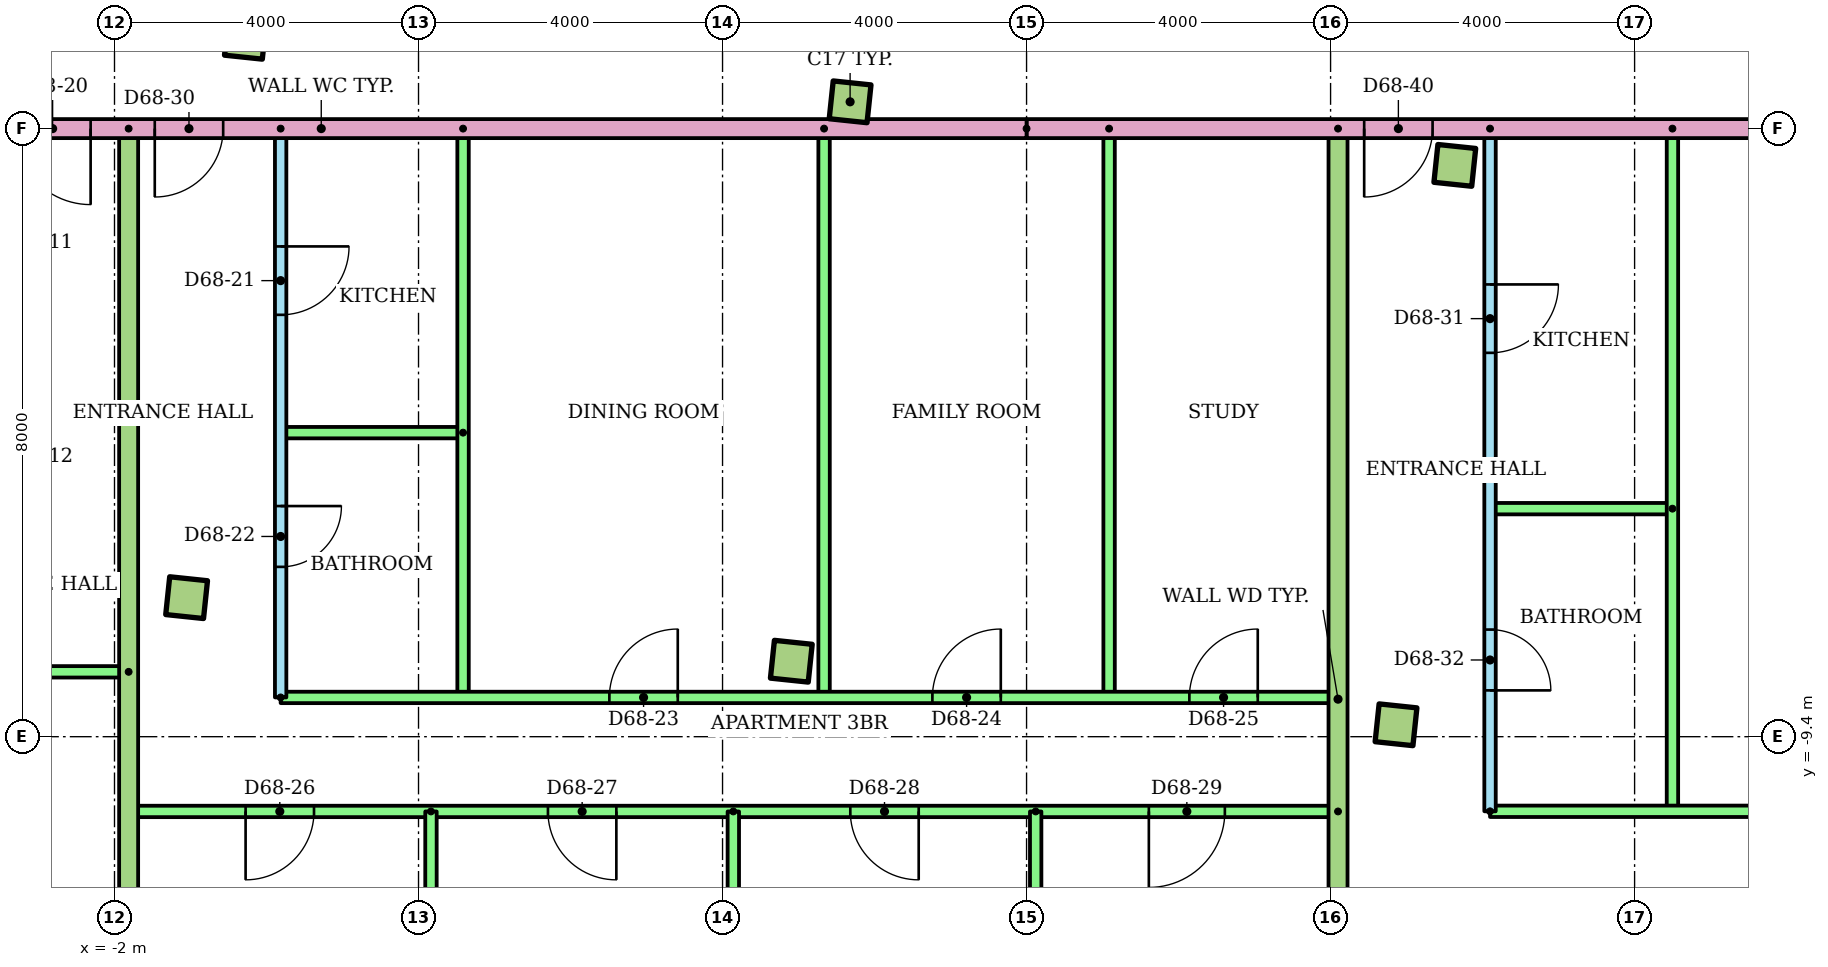
"""IFC4 building model, lengths in metres.
Left out: names, types, materials, properties, quantities, classifications, styles, units other than length and angle.
Written with IfcOpenShell. Run it as: python <this file> out.ifc"""

import sys

from ifc_helpers import new_model, si_unit, direction, frame, frame_2d, origin, origin_2d, place, context, subcontext, project, spatial, rectangle, extrude, element, fill, save


model = new_model("IFC4")
c1 = context("Model", 3, precision=1e-05, world=origin(), true_north=direction((0.0, 1.0)))
c2 = subcontext(c1, "Body", "Model", "MODEL_VIEW")
j1 = project(units=[si_unit("LENGTHUNIT", "METRE"), si_unit("PLANEANGLEUNIT", "RADIAN")], contexts=[c1])
p1 = place(None, origin())
s1 = spatial("IfcSite", under=j1, at=p1, CompositionType="ELEMENT")
p2 = place(p1, origin())
s2 = spatial("IfcBuilding", under=s1, at=p2, CompositionType="ELEMENT")
p3 = place(p2, frame((0.0, 0.0, 262.7)))
s3 = spatial("IfcBuildingStorey", under=s2, at=p3, CompositionType="ELEMENT", Elevation=262.7)
for number, where, z_axis, x_axis in (
    (1, (-1.051, -7.571, 0.0), (0.0, 0.0, 1.0), (0.995, -0.105, 0.0)),
    (2, (6.905, -8.407, 0.0), (0.0, 0.0, 1.0), (0.995, -0.105, 0.0)),
    (3, (14.861, -9.243, 0.0), (0.0, 0.0, 1.0), (0.995, -0.105, 0.0)),
    (4, (-0.278, -0.211, 0.0), (0.0, 0.0, 1.0), (0.995, -0.105, 0.0)),
    (5, (7.678, -1.048, 0.0), (0.0, 0.0, 1.0), (0.995, -0.105, 0.0)),
    (6, (15.635, -1.884, 0.0), (0.0, 0.0, 1.0), (0.995, -0.105, 0.0)),
):
    element("IfcColumn", number, at=place(p3, frame(where, z_axis=z_axis, x_axis=x_axis)), inside=s3, PredefinedType="COLUMN", context=c2, shape_type="SweptSolid", body=[
        extrude(rectangle(XDim=0.5, YDim=0.5, at=origin_2d()), origin(), (0.0, 0.0, 1.0), 3.2),
    ])
p4 = place(p3, frame((-1.814, -8.547, 0.0), z_axis=(0.0, 0.0, 1.0), x_axis=(-1.0, 0.0, 0.0)))
e7 = element("IfcWall", 7, at=p4, inside=s3, PredefinedType="PARTITIONING", context=c2, shape_type="SweptSolid", body=[
    extrude(rectangle(XDim=20.767, YDim=0.15, at=frame_2d((10.384, 0.0))), origin(), (0.0, 0.0, 1.0), 2.4),
])
p5 = place(p4, frame((16.604, 0.0, 0.0)))
e8 = element("IfcOpeningElement", 8, at=p5, cuts=e7, PredefinedType="OPENING", context=c2, shape_type="SweptSolid", body=[
    extrude(rectangle(XDim=0.9, YDim=2.1, at=frame_2d((0.45, 1.05))), frame((0.0, 0.085, 0.0), z_axis=(0.0, -1.0, 0.0), x_axis=(1.0, 0.0, 0.0)), (0.0, 0.0, 1.0), 0.17),
])
p6 = place(p4, frame((9.446, 0.0, 0.0)))
e9 = element("IfcOpeningElement", 9, at=p6, cuts=e7, PredefinedType="OPENING", context=c2, shape_type="SweptSolid", body=[
    extrude(rectangle(XDim=1.0, YDim=2.1, at=frame_2d((0.5, 1.05))), frame((0.0, 0.085, 0.0), z_axis=(0.0, -1.0, 0.0), x_axis=(1.0, 0.0, 0.0)), (0.0, 0.0, 1.0), 0.17),
])
p7 = place(p4, frame((5.517, 0.0, 0.0)))
e10 = element("IfcOpeningElement", 10, at=p7, cuts=e7, PredefinedType="OPENING", context=c2, shape_type="SweptSolid", body=[
    extrude(rectangle(XDim=0.9, YDim=2.1, at=frame_2d((0.45, 1.05))), frame((0.0, 0.085, 0.0), z_axis=(0.0, -1.0, 0.0), x_axis=(1.0, 0.0, 0.0)), (0.0, 0.0, 1.0), 0.17),
])
p8 = place(p4, frame((1.539, 0.0, 0.0)))
e11 = element("IfcOpeningElement", 11, at=p8, cuts=e7, PredefinedType="OPENING", context=c2, shape_type="SweptSolid", body=[
    extrude(rectangle(XDim=0.9, YDim=2.1, at=frame_2d((0.45, 1.05))), frame((0.0, 0.085, 0.0), z_axis=(0.0, -1.0, 0.0), x_axis=(1.0, 0.0, 0.0)), (0.0, 0.0, 1.0), 0.17),
])
p9 = place(p3, frame((0.186, -1.4, 0.0), z_axis=(0.0, 0.0, 1.0), x_axis=(0.0, -1.0, 0.0)))
e12 = element("IfcWall", 12, at=p9, inside=s3, PredefinedType="PARTITIONING", context=c2, shape_type="SweptSolid", body=[
    extrude(rectangle(XDim=7.484, YDim=0.15, at=frame_2d((3.742, 0.0))), origin(), (0.0, 0.0, 1.0), 2.4),
])
p10 = place(p9, frame((1.55, 0.0, 0.0)))
e13 = element("IfcOpeningElement", 13, at=p10, cuts=e12, PredefinedType="OPENING", context=c2, shape_type="SweptSolid", body=[
    extrude(rectangle(XDim=0.9, YDim=2.1, at=frame_2d((0.45, 1.05))), frame((0.0, 0.085, 0.0), z_axis=(0.0, -1.0, 0.0), x_axis=(1.0, 0.0, 0.0)), (0.0, 0.0, 1.0), 0.17),
])
p11 = place(p9, frame((4.966, 0.0, 0.0)))
e14 = element("IfcOpeningElement", 14, at=p11, cuts=e12, PredefinedType="OPENING", context=c2, shape_type="SweptSolid", body=[
    extrude(rectangle(XDim=0.8, YDim=2.1, at=frame_2d((0.4, 1.05))), frame((0.0, 0.085, 0.0), z_axis=(0.0, -1.0, 0.0), x_axis=(1.0, 0.0, 0.0)), (0.0, 0.0, 1.0), 0.17),
])
p12 = place(p3, frame((2.586, -5.4, 0.0), z_axis=(0.0, 0.0, 1.0), x_axis=(-1.0, 0.0, 0.0)))
e15 = element("IfcWall", 15, at=p12, inside=s3, PredefinedType="PARTITIONING", context=c2, shape_type="SweptSolid", body=[
    extrude(rectangle(XDim=2.4, YDim=0.15, at=frame_2d((1.2, 0.0))), origin(), (0.0, 0.0, 1.0), 2.4),
])
for number, where, z_axis, x_axis in (
    (16, (2.586, -1.4, 0.0), (0.0, 0.0, 1.0), (0.0, -1.0, 0.0)),
    (17, (7.336, -1.4, 0.0), (0.0, 0.0, 1.0), (0.0, -1.0, 0.0)),
    (18, (11.086, -1.4, 0.0), (0.0, 0.0, 1.0), (0.0, -1.0, 0.0)),
):
    element("IfcWall", number, at=place(p3, frame(where, z_axis=z_axis, x_axis=x_axis)), inside=s3, PredefinedType="PARTITIONING", context=c2, shape_type="SweptSolid", body=[
        extrude(rectangle(XDim=7.484, YDim=0.15, at=frame_2d((3.742, 0.0))), origin(), (0.0, 0.0, 1.0), 2.4),
    ])
p13 = place(p3, frame((0.186, -8.884, 0.0)))
e19 = element("IfcWall", 19, at=p13, inside=s3, PredefinedType="PARTITIONING", context=c2, shape_type="SweptSolid", body=[
    extrude(rectangle(XDim=13.912, YDim=0.15, at=frame_2d((6.956, 0.0))), origin(), (0.0, 0.0, 1.0), 2.4),
])
p14 = place(p13, frame((4.325, 0.0, 0.0)))
e20 = element("IfcOpeningElement", 20, at=p14, cuts=e19, PredefinedType="OPENING", context=c2, shape_type="SweptSolid", body=[
    extrude(rectangle(XDim=0.9, YDim=2.1, at=frame_2d((0.45, 1.05))), frame((0.0, 0.085, 0.0), z_axis=(0.0, -1.0, 0.0), x_axis=(1.0, 0.0, 0.0)), (0.0, 0.0, 1.0), 0.17),
])
p15 = place(p13, frame((8.575, 0.0, 0.0)))
e21 = element("IfcOpeningElement", 21, at=p15, cuts=e19, PredefinedType="OPENING", context=c2, shape_type="SweptSolid", body=[
    extrude(rectangle(XDim=0.9, YDim=2.1, at=frame_2d((0.45, 1.05))), frame((0.0, 0.085, 0.0), z_axis=(0.0, -1.0, 0.0), x_axis=(1.0, 0.0, 0.0)), (0.0, 0.0, 1.0), 0.17),
])
p16 = place(p13, frame((11.956, 0.0, 0.0)))
e22 = element("IfcOpeningElement", 22, at=p16, cuts=e19, PredefinedType="OPENING", context=c2, shape_type="SweptSolid", body=[
    extrude(rectangle(XDim=0.9, YDim=2.1, at=frame_2d((0.45, 1.05))), frame((0.0, 0.085, 0.0), z_axis=(0.0, -1.0, 0.0), x_axis=(1.0, 0.0, 0.0)), (0.0, 0.0, 1.0), 0.17),
])
p17 = place(p3, frame((14.098, -10.384, 0.0), z_axis=(0.0, 0.0, 1.0), x_axis=(-1.0, 0.0, 0.0)))
e23 = element("IfcWall", 23, at=p17, inside=s3, PredefinedType="PARTITIONING", context=c2, shape_type="SweptSolid", body=[
    extrude(rectangle(XDim=15.912, YDim=0.15, at=frame_2d((7.956, 0.0))), origin(), (0.0, 0.0, 1.0), 2.4),
])
p18 = place(p17, frame((13.473, 0.0, 0.0)))
e24 = element("IfcOpeningElement", 24, at=p18, cuts=e23, PredefinedType="OPENING", context=c2, shape_type="SweptSolid", body=[
    extrude(rectangle(XDim=0.9, YDim=2.1, at=frame_2d((0.45, 1.05))), frame((0.0, 0.085, 0.0), z_axis=(0.0, -1.0, 0.0), x_axis=(1.0, 0.0, 0.0)), (0.0, 0.0, 1.0), 0.17),
])
p19 = place(p17, frame((9.495, 0.0, 0.0)))
e25 = element("IfcOpeningElement", 25, at=p19, cuts=e23, PredefinedType="OPENING", context=c2, shape_type="SweptSolid", body=[
    extrude(rectangle(XDim=0.9, YDim=2.1, at=frame_2d((0.45, 1.05))), frame((0.0, 0.085, 0.0), z_axis=(0.0, -1.0, 0.0), x_axis=(1.0, 0.0, 0.0)), (0.0, 0.0, 1.0), 0.17),
])
p20 = place(p17, frame((5.517, 0.0, 0.0)))
e26 = element("IfcOpeningElement", 26, at=p20, cuts=e23, PredefinedType="OPENING", context=c2, shape_type="SweptSolid", body=[
    extrude(rectangle(XDim=0.9, YDim=2.1, at=frame_2d((0.45, 1.05))), frame((0.0, 0.085, 0.0), z_axis=(0.0, -1.0, 0.0), x_axis=(1.0, 0.0, 0.0)), (0.0, 0.0, 1.0), 0.17),
])
p21 = place(p17, frame((1.489, 0.0, 0.0)))
e27 = element("IfcOpeningElement", 27, at=p21, cuts=e23, PredefinedType="OPENING", context=c2, shape_type="SweptSolid", body=[
    extrude(rectangle(XDim=1.0, YDim=2.1, at=frame_2d((0.5, 1.05))), frame((0.0, 0.085, 0.0), z_axis=(0.0, -1.0, 0.0), x_axis=(1.0, 0.0, 0.0)), (0.0, 0.0, 1.0), 0.17),
])
p22 = place(p3, frame((2.164, -10.384, 0.0), z_axis=(0.0, 0.0, 1.0), x_axis=(0.0, -1.0, 0.0)))
e28 = element("IfcWall", 28, at=p22, inside=s3, PredefinedType="PARTITIONING", context=c2, shape_type="SweptSolid", body=[
    extrude(rectangle(XDim=4.786, YDim=0.15, at=frame_2d((2.393, 0.0))), origin(), (0.0, 0.0, 1.0), 2.4),
])
p23 = place(p3, frame((6.142, -10.384, 0.0), z_axis=(0.0, 0.0, 1.0), x_axis=(0.0, -1.0, 0.0)))
e29 = element("IfcWall", 29, at=p23, inside=s3, PredefinedType="PARTITIONING", context=c2, shape_type="SweptSolid", body=[
    extrude(rectangle(XDim=5.193, YDim=0.15, at=frame_2d((2.597, 0.0))), origin(), (0.0, 0.0, 1.0), 2.4),
])
p24 = place(p3, frame((10.12, -10.384, 0.0), z_axis=(0.0, 0.0, 1.0), x_axis=(0.0, -1.0, 0.0)))
e30 = element("IfcWall", 30, at=p24, inside=s3, PredefinedType="PARTITIONING", context=c2, shape_type="SweptSolid", body=[
    extrude(rectangle(XDim=5.622, YDim=0.15, at=frame_2d((2.811, 0.0))), origin(), (0.0, 0.0, 1.0), 2.4),
])
p25 = place(p3, frame((-1.814, -1.4, 0.0), z_axis=(0.0, 0.0, 1.0), x_axis=(0.0, -1.0, 0.0)))
e31 = element("IfcWall", 31, at=p25, inside=s3, PredefinedType="PARTITIONING", context=c2, shape_type="SweptSolid", body=[
    extrude(rectangle(XDim=13.341, YDim=0.25, at=frame_2d((6.67, 0.0))), origin(), (0.0, 0.0, 1.0), 2.4),
])
p26 = place(p3, frame((16.098, -1.4, 0.0), z_axis=(0.0, 0.0, 1.0), x_axis=(0.0, -1.0, 0.0)))
e32 = element("IfcWall", 32, at=p26, inside=s3, PredefinedType="PARTITIONING", context=c2, shape_type="SweptSolid", body=[
    extrude(rectangle(XDim=8.982, YDim=0.15, at=frame_2d((4.491, 0.0))), origin(), (0.0, 0.0, 1.0), 2.4),
])
p27 = place(p26, frame((2.05, 0.0, 0.0)))
e33 = element("IfcOpeningElement", 33, at=p27, cuts=e32, PredefinedType="OPENING", context=c2, shape_type="SweptSolid", body=[
    extrude(rectangle(XDim=0.9, YDim=2.1, at=frame_2d((0.45, 1.05))), frame((0.0, 0.085, 0.0), z_axis=(0.0, -1.0, 0.0), x_axis=(1.0, 0.0, 0.0)), (0.0, 0.0, 1.0), 0.17),
])
p28 = place(p26, frame((6.591, 0.0, 0.0)))
e34 = element("IfcOpeningElement", 34, at=p28, cuts=e32, PredefinedType="OPENING", context=c2, shape_type="SweptSolid", body=[
    extrude(rectangle(XDim=0.8, YDim=2.1, at=frame_2d((0.4, 1.05))), frame((0.0, 0.085, 0.0), z_axis=(0.0, -1.0, 0.0), x_axis=(1.0, 0.0, 0.0)), (0.0, 0.0, 1.0), 0.17),
])
p29 = place(p3, frame((18.498, -6.4, 0.0), z_axis=(0.0, 0.0, 1.0), x_axis=(-1.0, 0.0, 0.0)))
e35 = element("IfcWall", 35, at=p29, inside=s3, PredefinedType="PARTITIONING", context=c2, shape_type="SweptSolid", body=[
    extrude(rectangle(XDim=2.4, YDim=0.15, at=frame_2d((1.2, 0.0))), origin(), (0.0, 0.0, 1.0), 2.4),
])
p30 = place(p3, frame((18.498, -1.4, 0.0), z_axis=(0.0, 0.0, 1.0), x_axis=(0.0, -1.0, 0.0)))
e36 = element("IfcWall", 36, at=p30, inside=s3, PredefinedType="PARTITIONING", context=c2, shape_type="SweptSolid", body=[
    extrude(rectangle(XDim=8.982, YDim=0.15, at=frame_2d((4.491, 0.0))), origin(), (0.0, 0.0, 1.0), 2.4),
])
p31 = place(p3, frame((16.098, -10.382, 0.0)))
e37 = element("IfcWall", 37, at=p31, inside=s3, PredefinedType="PARTITIONING", context=c2, shape_type="SweptSolid", body=[
    extrude(rectangle(XDim=13.747, YDim=0.15, at=frame_2d((6.874, 0.0))), origin(), (0.0, 0.0, 1.0), 2.4),
])
p32 = place(p31, frame((4.825, 0.0, 0.0)))
e38 = element("IfcOpeningElement", 38, at=p32, cuts=e37, PredefinedType="OPENING", context=c2, shape_type="SweptSolid", body=[
    extrude(rectangle(XDim=0.9, YDim=2.1, at=frame_2d((0.45, 1.05))), frame((0.0, 0.085, 0.0), z_axis=(0.0, -1.0, 0.0), x_axis=(1.0, 0.0, 0.0)), (0.0, 0.0, 1.0), 0.17),
])
p33 = place(p31, frame((9.95, 0.0, 0.0)))
e39 = element("IfcOpeningElement", 39, at=p33, cuts=e37, PredefinedType="OPENING", context=c2, shape_type="SweptSolid", body=[
    extrude(rectangle(XDim=0.9, YDim=2.1, at=frame_2d((0.45, 1.05))), frame((0.0, 0.085, 0.0), z_axis=(0.0, -1.0, 0.0), x_axis=(1.0, 0.0, 0.0)), (0.0, 0.0, 1.0), 0.17),
])
p34 = place(p31, frame((12.747, 0.0, 0.0)))
e40 = element("IfcOpeningElement", 40, at=p34, cuts=e37, PredefinedType="OPENING", context=c2, shape_type="SweptSolid", body=[
    extrude(rectangle(XDim=0.9, YDim=2.1, at=frame_2d((0.45, 1.05))), frame((0.0, 0.085, 0.0), z_axis=(0.0, -1.0, 0.0), x_axis=(1.0, 0.0, 0.0)), (0.0, 0.0, 1.0), 0.17),
])
p35 = place(p3, frame((14.098, -1.4, 0.0), z_axis=(0.0, 0.0, 1.0), x_axis=(0.0, -1.0, 0.0)))
e41 = element("IfcWall", 41, at=p35, inside=s3, PredefinedType="PARTITIONING", context=c2, shape_type="SweptSolid", body=[
    extrude(rectangle(XDim=15.013, YDim=0.25, at=frame_2d((7.506, 0.0))), origin(), (0.0, 0.0, 1.0), 2.4),
])
p36 = place(p3, frame((25.0, -1.4, 0.0), z_axis=(0.0, 0.0, 1.0), x_axis=(-1.0, 0.0, 0.0)))
e42 = element("IfcWall", 42, at=p36, inside=s3, PredefinedType="PARTITIONING", context=c2, shape_type="SweptSolid", body=[
    extrude(rectangle(XDim=15.0, YDim=0.25, at=frame_2d((7.5, 0.0))), origin(), (0.0, 0.0, 1.0), 2.4),
])
p37 = place(p36, frame((9.658, 0.0, 0.0)))
e43 = element("IfcOpeningElement", 43, at=p37, cuts=e42, PredefinedType="OPENING", context=c2, shape_type="SweptSolid", body=[
    extrude(rectangle(XDim=0.9, YDim=2.1, at=frame_2d((0.45, 1.05))), frame((0.0, 0.135, 0.0), z_axis=(0.0, -1.0, 0.0), x_axis=(1.0, 0.0, 0.0)), (0.0, 0.0, 1.0), 0.27),
])
p38 = place(p3, frame((10.0, -1.4, 0.0), z_axis=(0.0, 0.0, 1.0), x_axis=(-1.0, 0.0, 0.0)))
e44 = element("IfcWall", 44, at=p38, inside=s3, PredefinedType="PARTITIONING", context=c2, shape_type="SweptSolid", body=[
    extrude(rectangle(XDim=20.0, YDim=0.25, at=frame_2d((10.0, 0.0))), origin(), (0.0, 0.0, 1.0), 2.4),
])
p39 = place(p38, frame((12.314, 0.0, 0.0)))
e45 = element("IfcOpeningElement", 45, at=p39, cuts=e44, PredefinedType="OPENING", context=c2, shape_type="SweptSolid", body=[
    extrude(rectangle(XDim=1.0, YDim=2.1, at=frame_2d((0.5, 1.05))), frame((0.0, 0.135, 0.0), z_axis=(0.0, -1.0, 0.0), x_axis=(1.0, 0.0, 0.0)), (0.0, 0.0, 1.0), 0.27),
])
p40 = place(p38, frame((10.57, 0.0, 0.0)))
e46 = element("IfcOpeningElement", 46, at=p40, cuts=e44, PredefinedType="OPENING", context=c2, shape_type="SweptSolid", body=[
    extrude(rectangle(XDim=0.9, YDim=2.1, at=frame_2d((0.45, 1.05))), frame((0.0, 0.135, 0.0), z_axis=(0.0, -1.0, 0.0), x_axis=(1.0, 0.0, 0.0)), (0.0, 0.0, 1.0), 0.27),
])
p41 = place(p39, origin())
e47 = element("IfcDoor", 47, at=p41, inside=s3, OperationType="SINGLE_SWING_LEFT", PredefinedType="DOOR", context=c2, shape_type="SweptSolid", body=[
    extrude(rectangle(XDim=1.0, YDim=2.1, at=frame_2d((0.5, 1.05))), frame((0.0, 0.025, 0.0), z_axis=(0.0, -1.0, 0.0), x_axis=(1.0, 0.0, 0.0)), (0.0, 0.0, 1.0), 0.05),
])
fill(e45, e47)
p42 = place(p10, origin())
e48 = element("IfcDoor", 48, at=p42, inside=s3, OperationType="SINGLE_SWING_LEFT", PredefinedType="DOOR", context=c2, shape_type="SweptSolid", body=[
    extrude(rectangle(XDim=0.9, YDim=2.1, at=frame_2d((0.45, 1.05))), frame((0.0, 0.025, 0.0), z_axis=(0.0, -1.0, 0.0), x_axis=(1.0, 0.0, 0.0)), (0.0, 0.0, 1.0), 0.05),
])
fill(e13, e48)
p43 = place(p11, origin())
e49 = element("IfcDoor", 49, at=p43, inside=s3, OperationType="SINGLE_SWING_LEFT", PredefinedType="DOOR", context=c2, shape_type="SweptSolid", body=[
    extrude(rectangle(XDim=0.8, YDim=2.1, at=frame_2d((0.4, 1.05))), frame((0.0, 0.025, 0.0), z_axis=(0.0, -1.0, 0.0), x_axis=(1.0, 0.0, 0.0)), (0.0, 0.0, 1.0), 0.05),
])
fill(e14, e49)
p44 = place(p14, origin())
e50 = element("IfcDoor", 50, at=p44, inside=s3, OperationType="SINGLE_SWING_RIGHT", PredefinedType="DOOR", context=c2, shape_type="SweptSolid", body=[
    extrude(rectangle(XDim=0.9, YDim=2.1, at=frame_2d((0.45, 1.05))), frame((0.0, 0.025, 0.0), z_axis=(0.0, -1.0, 0.0), x_axis=(1.0, 0.0, 0.0)), (0.0, 0.0, 1.0), 0.05),
])
fill(e20, e50)
p45 = place(p15, origin())
e51 = element("IfcDoor", 51, at=p45, inside=s3, OperationType="SINGLE_SWING_RIGHT", PredefinedType="DOOR", context=c2, shape_type="SweptSolid", body=[
    extrude(rectangle(XDim=0.9, YDim=2.1, at=frame_2d((0.45, 1.05))), frame((0.0, 0.025, 0.0), z_axis=(0.0, -1.0, 0.0), x_axis=(1.0, 0.0, 0.0)), (0.0, 0.0, 1.0), 0.05),
])
fill(e21, e51)
p46 = place(p16, origin())
e52 = element("IfcDoor", 52, at=p46, inside=s3, OperationType="SINGLE_SWING_RIGHT", PredefinedType="DOOR", context=c2, shape_type="SweptSolid", body=[
    extrude(rectangle(XDim=0.9, YDim=2.1, at=frame_2d((0.45, 1.05))), frame((0.0, 0.025, 0.0), z_axis=(0.0, -1.0, 0.0), x_axis=(1.0, 0.0, 0.0)), (0.0, 0.0, 1.0), 0.05),
])
fill(e22, e52)
p47 = place(p18, origin())
e53 = element("IfcDoor", 53, at=p47, inside=s3, OperationType="SINGLE_SWING_RIGHT", PredefinedType="DOOR", context=c2, shape_type="SweptSolid", body=[
    extrude(rectangle(XDim=0.9, YDim=2.1, at=frame_2d((0.45, 1.05))), frame((0.0, 0.025, 0.0), z_axis=(0.0, -1.0, 0.0), x_axis=(1.0, 0.0, 0.0)), (0.0, 0.0, 1.0), 0.05),
])
fill(e24, e53)
p48 = place(p19, origin())
e54 = element("IfcDoor", 54, at=p48, inside=s3, OperationType="SINGLE_SWING_LEFT", PredefinedType="DOOR", context=c2, shape_type="SweptSolid", body=[
    extrude(rectangle(XDim=0.9, YDim=2.1, at=frame_2d((0.45, 1.05))), frame((0.0, 0.025, 0.0), z_axis=(0.0, -1.0, 0.0), x_axis=(1.0, 0.0, 0.0)), (0.0, 0.0, 1.0), 0.05),
])
fill(e25, e54)
p49 = place(p20, origin())
e55 = element("IfcDoor", 55, at=p49, inside=s3, OperationType="SINGLE_SWING_LEFT", PredefinedType="DOOR", context=c2, shape_type="SweptSolid", body=[
    extrude(rectangle(XDim=0.9, YDim=2.1, at=frame_2d((0.45, 1.05))), frame((0.0, 0.025, 0.0), z_axis=(0.0, -1.0, 0.0), x_axis=(1.0, 0.0, 0.0)), (0.0, 0.0, 1.0), 0.05),
])
fill(e26, e55)
p50 = place(p21, origin())
e56 = element("IfcDoor", 56, at=p50, inside=s3, OperationType="SINGLE_SWING_RIGHT", PredefinedType="DOOR", context=c2, shape_type="SweptSolid", body=[
    extrude(rectangle(XDim=1.0, YDim=2.1, at=frame_2d((0.5, 1.05))), frame((0.0, 0.025, 0.0), z_axis=(0.0, -1.0, 0.0), x_axis=(1.0, 0.0, 0.0)), (0.0, 0.0, 1.0), 0.05),
])
fill(e27, e56)
p51 = place(p40, origin())
e57 = element("IfcDoor", 57, at=p51, inside=s3, OperationType="SINGLE_SWING_RIGHT", PredefinedType="DOOR", context=c2, shape_type="SweptSolid", body=[
    extrude(rectangle(XDim=0.9, YDim=2.1, at=frame_2d((0.45, 1.05))), frame((0.0, 0.025, 0.0), z_axis=(0.0, -1.0, 0.0), x_axis=(1.0, 0.0, 0.0)), (0.0, 0.0, 1.0), 0.05),
])
fill(e46, e57)
p52 = place(p27, origin())
e58 = element("IfcDoor", 58, at=p52, inside=s3, OperationType="SINGLE_SWING_LEFT", PredefinedType="DOOR", context=c2, shape_type="SweptSolid", body=[
    extrude(rectangle(XDim=0.9, YDim=2.1, at=frame_2d((0.45, 1.05))), frame((0.0, 0.025, 0.0), z_axis=(0.0, -1.0, 0.0), x_axis=(1.0, 0.0, 0.0)), (0.0, 0.0, 1.0), 0.05),
])
fill(e33, e58)
p53 = place(p28, origin())
e59 = element("IfcDoor", 59, at=p53, inside=s3, OperationType="SINGLE_SWING_RIGHT", PredefinedType="DOOR", context=c2, shape_type="SweptSolid", body=[
    extrude(rectangle(XDim=0.8, YDim=2.1, at=frame_2d((0.4, 1.05))), frame((0.0, 0.025, 0.0), z_axis=(0.0, -1.0, 0.0), x_axis=(1.0, 0.0, 0.0)), (0.0, 0.0, 1.0), 0.05),
])
fill(e34, e59)
p54 = place(p37, origin())
e60 = element("IfcDoor", 60, at=p54, inside=s3, OperationType="SINGLE_SWING_RIGHT", PredefinedType="DOOR", context=c2, shape_type="SweptSolid", body=[
    extrude(rectangle(XDim=0.9, YDim=2.1, at=frame_2d((0.45, 1.05))), frame((0.0, 0.025, 0.0), z_axis=(0.0, -1.0, 0.0), x_axis=(1.0, 0.0, 0.0)), (0.0, 0.0, 1.0), 0.05),
])
fill(e43, e60)
save(model, sys.argv[1])
